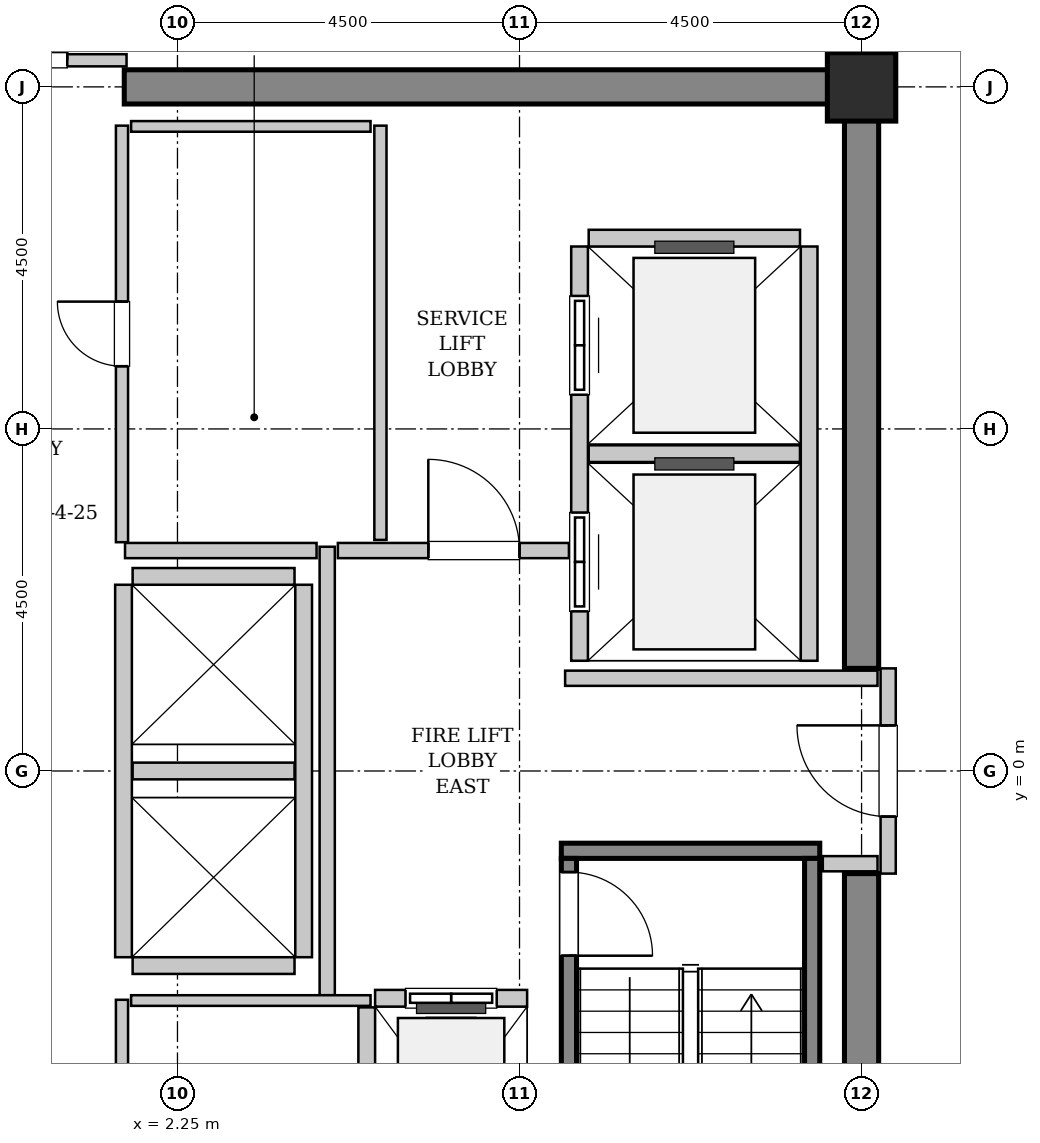
"""IFC4 building model, lengths in metres.
Left out: names, types, materials, properties, quantities, classifications, styles, units other than length and angle.
Written with IfcOpenShell. Run it as: python <this file> out.ifc"""

import sys

from ifc_helpers import new_model, si_unit, direction, frame, frame_2d, origin, origin_2d, place, context, subcontext, project, spatial, rectangle, extrude, source, transform, mapped, element, fill, save


model = new_model("IFC4")
c1 = context("Model", 3, precision=1e-05, world=origin(), true_north=direction((0.0, 1.0)))
c2 = subcontext(c1, "Body", "Model", "MODEL_VIEW")
j1 = project(units=[si_unit("LENGTHUNIT", "METRE"), si_unit("PLANEANGLEUNIT", "RADIAN")], contexts=[c1])
p1 = place(None, origin())
s1 = spatial("IfcSite", under=j1, at=p1, CompositionType="ELEMENT")
p2 = place(p1, origin())
s2 = spatial("IfcBuilding", under=s1, at=p2, CompositionType="ELEMENT")
p3 = place(p2, frame((0.0, 0.0, 306.4)))
s3 = spatial("IfcBuildingStorey", under=s2, at=p3, CompositionType="ELEMENT", Elevation=306.4)
m1 = source(origin(), c2, "Body", "SweptSolid", [
    extrude(rectangle(XDim=9.925, YDim=0.45, at=frame_2d((4.962, 0.0))), origin(), (0.0, 0.0, 1.0), 3.8),
])
p4 = place(p3, frame((1.55, 9.0, 0.0), z_axis=(0.0, 0.0, 1.0), x_axis=(1.0, 0.0, 0.0)))
e1 = element("IfcWall", 1, at=p4, inside=s3, PredefinedType="SHEAR", context=c2, shape_type="MappedRepresentation", body=[
    mapped(m1, transform((0.0, 0.0, 0.0), x_axis=(1.0, 0.0, 0.0), y_axis=(0.0, 1.0, 0.0), z_axis=(0.0, 0.0, 1.0), scale=1.0)),
])
m2 = source(origin(), c2, "Body", "SweptSolid", [
    extrude(rectangle(XDim=7.425, YDim=0.45, at=frame_2d((3.712, 0.0))), origin(), (0.0, 0.0, 1.0), 3.8),
])
for number, where, z_axis, x_axis in (
    (2, (11.25, -8.775, 0.0), (0.0, 0.0, 1.0), (0.0, 1.0, 0.0)),
    (3, (11.25, 1.35, 0.0), (0.0, 0.0, 1.0), (0.0, 1.0, 0.0)),
):
    element("IfcWall", number, at=place(p3, frame(where, z_axis=z_axis, x_axis=x_axis)), inside=s3, PredefinedType="SHEAR", context=c2, shape_type="MappedRepresentation", body=[
        mapped(m2, transform((0.0, 0.0, 0.0), x_axis=(1.0, 0.0, 0.0), y_axis=(0.0, 1.0, 0.0), z_axis=(0.0, 0.0, 1.0), scale=1.0)),
    ])
m3 = source(origin(), c2, "Body", "SweptSolid", [
    extrude(rectangle(XDim=0.9, YDim=0.9, at=origin_2d()), origin(), (0.0, 0.0, 1.0), 3.8),
])
p5 = place(p3, frame((11.25, 9.0, 0.0), z_axis=(0.0, 0.0, 1.0), x_axis=(1.0, 0.0, 0.0)))
e4 = element("IfcColumn", 4, at=p5, inside=s3, PredefinedType="COLUMN", context=c2, shape_type="MappedRepresentation", body=[
    mapped(m3, transform((0.0, 0.0, 0.0), x_axis=(1.0, 0.0, 0.0), y_axis=(0.0, 1.0, 0.0), z_axis=(0.0, 0.0, 1.0), scale=1.0)),
])
m4 = source(origin(), c2, "Body", "SweptSolid", [
    extrude(rectangle(XDim=3.4, YDim=0.2, at=frame_2d((1.7, 0.0))), origin(), (0.0, 0.0, 1.0), 3.8),
])
p6 = place(p3, frame((7.3, -1.05, 0.0), z_axis=(0.0, 0.0, 1.0), x_axis=(1.0, 0.0, 0.0)))
e5 = element("IfcWall", 5, at=p6, inside=s3, PredefinedType="SOLIDWALL", context=c2, shape_type="MappedRepresentation", body=[
    mapped(m4, transform((0.0, 0.0, 0.0), x_axis=(1.0, 0.0, 0.0), y_axis=(0.0, 1.0, 0.0), z_axis=(0.0, 0.0, 1.0), scale=1.0)),
])
m5 = source(origin(), c2, "Body", "SweptSolid", [
    extrude(rectangle(XDim=7.1, YDim=0.2, at=frame_2d((3.55, 0.0))), origin(), (0.0, 0.0, 1.0), 3.8),
])
p7 = place(p3, frame((7.4, -1.15, 0.0), z_axis=(0.0, 0.0, 1.0), x_axis=(0.0, -1.0, 0.0)))
e6 = element("IfcWall", 6, at=p7, inside=s3, PredefinedType="SOLIDWALL", context=c2, shape_type="MappedRepresentation", body=[
    mapped(m5, transform((0.0, 0.0, 0.0), x_axis=(1.0, 0.0, 0.0), y_axis=(0.0, 1.0, 0.0), z_axis=(0.0, 0.0, 1.0), scale=1.0)),
])
p8 = place(p7, frame((0.18, 0.0, 0.0)))
e7 = element("IfcOpeningElement", 7, at=p8, cuts=e6, PredefinedType="OPENING", context=c2, shape_type="SweptSolid", body=[
    extrude(rectangle(XDim=1.1, YDim=2.15, at=frame_2d((0.55, 1.075))), frame((0.0, 0.11, 0.0), z_axis=(0.0, -1.0, 0.0), x_axis=(1.0, 0.0, 0.0)), (0.0, 0.0, 1.0), 0.22),
])
p9 = place(p3, frame((10.6, -1.15, 0.0), z_axis=(0.0, 0.0, 1.0), x_axis=(0.0, -1.0, 0.0)))
e8 = element("IfcWall", 8, at=p9, inside=s3, PredefinedType="SOLIDWALL", context=c2, shape_type="MappedRepresentation", body=[
    mapped(m5, transform((0.0, 0.0, 0.0), x_axis=(1.0, 0.0, 0.0), y_axis=(0.0, 1.0, 0.0), z_axis=(0.0, 0.0, 1.0), scale=1.0)),
])
m6 = source(origin(), c2, "Body", "SweptSolid", [
    extrude(rectangle(XDim=2.0, YDim=0.22, at=frame_2d((1.0, 0.0))), origin(), (0.0, 0.0, 1.0), 3.535),
])
p10 = place(p3, frame((6.85, -2.99, 0.0), z_axis=(0.0, 0.0, 1.0), x_axis=(-1.0, 0.0, 0.0)))
e9 = element("IfcWall", 9, at=p10, inside=s3, PredefinedType="SOLIDWALL", context=c2, shape_type="MappedRepresentation", body=[
    mapped(m6, transform((0.0, 0.0, 0.0), x_axis=(1.0, 0.0, 0.0), y_axis=(0.0, 1.0, 0.0), z_axis=(0.0, 0.0, 1.0), scale=1.0)),
])
p11 = place(p10, frame((0.4, 0.0, 0.0)))
e10 = element("IfcOpeningElement", 10, at=p11, cuts=e9, PredefinedType="OPENING", context=c2, shape_type="SweptSolid", body=[
    extrude(rectangle(XDim=1.2, YDim=2.2, at=frame_2d((0.6, 1.1))), frame((0.0, 0.12, 0.0), z_axis=(0.0, -1.0, 0.0), x_axis=(1.0, 0.0, 0.0)), (0.0, 0.0, 1.0), 0.24),
])
m7 = source(origin(), c2, "Body", "SweptSolid", [
    extrude(rectangle(XDim=2.68, YDim=0.22, at=frame_2d((1.34, 0.0))), origin(), (0.0, 0.0, 1.0), 3.535),
])
p12 = place(p3, frame((4.74, -3.11, 0.0), z_axis=(0.0, 0.0, 1.0), x_axis=(0.0, -1.0, 0.0)))
e11 = element("IfcWall", 11, at=p12, inside=s3, PredefinedType="SOLIDWALL", context=c2, shape_type="MappedRepresentation", body=[
    mapped(m7, transform((0.0, 0.0, 0.0), x_axis=(1.0, 0.0, 0.0), y_axis=(0.0, 1.0, 0.0), z_axis=(0.0, 0.0, 1.0), scale=1.0)),
])
m8 = source(origin(), c2, "Body", "SweptSolid", [
    extrude(rectangle(XDim=5.45, YDim=0.22, at=frame_2d((2.725, 0.0))), origin(), (0.0, 0.0, 1.0), 3.535),
])
p13 = place(p3, frame((7.54, 6.9, 0.0), z_axis=(0.0, 0.0, 1.0), x_axis=(0.0, -1.0, 0.0)))
e12 = element("IfcWall", 12, at=p13, inside=s3, PredefinedType="SOLIDWALL", context=c2, shape_type="MappedRepresentation", body=[
    mapped(m8, transform((0.0, 0.0, 0.0), x_axis=(1.0, 0.0, 0.0), y_axis=(0.0, 1.0, 0.0), z_axis=(0.0, 0.0, 1.0), scale=1.0)),
])
p14 = place(p13, frame((3.5, 0.0, 0.0)))
e13 = element("IfcOpeningElement", 13, at=p14, cuts=e12, PredefinedType="OPENING", context=c2, shape_type="SweptSolid", body=[
    extrude(rectangle(XDim=1.3, YDim=2.3, at=frame_2d((0.65, 1.15))), frame((0.0, 0.12, 0.0), z_axis=(0.0, -1.0, 0.0), x_axis=(1.0, 0.0, 0.0)), (0.0, 0.0, 1.0), 0.24),
])
p15 = place(p13, frame((0.65, 0.0, 0.0)))
e14 = element("IfcOpeningElement", 14, at=p15, cuts=e12, PredefinedType="OPENING", context=c2, shape_type="SweptSolid", body=[
    extrude(rectangle(XDim=1.3, YDim=2.3, at=frame_2d((0.65, 1.15))), frame((0.0, 0.12, 0.0), z_axis=(0.0, -1.0, 0.0), x_axis=(1.0, 0.0, 0.0)), (0.0, 0.0, 1.0), 0.24),
])
p16 = place(p3, frame((10.56, 1.45, 0.0), z_axis=(0.0, 0.0, 1.0), x_axis=(0.0, 1.0, 0.0)))
e15 = element("IfcWall", 15, at=p16, inside=s3, PredefinedType="SOLIDWALL", context=c2, shape_type="MappedRepresentation", body=[
    mapped(m8, transform((0.0, 0.0, 0.0), x_axis=(1.0, 0.0, 0.0), y_axis=(0.0, 1.0, 0.0), z_axis=(0.0, 0.0, 1.0), scale=1.0)),
])
m9 = source(origin(), c2, "Body", "SweptSolid", [
    extrude(rectangle(XDim=2.78, YDim=0.22, at=frame_2d((1.39, 0.0))), origin(), (0.0, 0.0, 1.0), 3.535),
])
for number, where, z_axis, x_axis in (
    (16, (7.66, 4.175, 0.0), (0.0, 0.0, 1.0), (1.0, 0.0, 0.0)),
    (17, (10.44, 7.01, 0.0), (0.0, 0.0, 1.0), (-1.0, 0.0, 0.0)),
):
    element("IfcWall", number, at=place(p3, frame(where, z_axis=z_axis, x_axis=x_axis)), inside=s3, PredefinedType="SOLIDWALL", context=c2, shape_type="MappedRepresentation", body=[
        mapped(m9, transform((0.0, 0.0, 0.0), x_axis=(1.0, 0.0, 0.0), y_axis=(0.0, 1.0, 0.0), z_axis=(0.0, 0.0, 1.0), scale=1.0)),
    ])
m10 = source(origin(), c2, "Body", "SweptSolid", [
    extrude(rectangle(XDim=4.9, YDim=0.22, at=frame_2d((2.45, 0.0))), origin(), (0.0, 0.0, 1.0), 3.535),
])
for number, where, z_axis, x_axis in (
    (18, (1.54, 2.45, 0.0), (0.0, 0.0, 1.0), (0.0, -1.0, 0.0)),
    (19, (3.91, -2.45, 0.0), (0.0, 0.0, 1.0), (0.0, 1.0, 0.0)),
):
    element("IfcWall", number, at=place(p3, frame(where, z_axis=z_axis, x_axis=x_axis)), inside=s3, PredefinedType="SOLIDWALL", context=c2, shape_type="MappedRepresentation", body=[
        mapped(m10, transform((0.0, 0.0, 0.0), x_axis=(1.0, 0.0, 0.0), y_axis=(0.0, 1.0, 0.0), z_axis=(0.0, 0.0, 1.0), scale=1.0)),
    ])
m11 = source(origin(), c2, "Body", "SweptSolid", [
    extrude(rectangle(XDim=2.13, YDim=0.22, at=frame_2d((1.065, 0.0))), origin(), (0.0, 0.0, 1.0), 3.535),
])
for number, where, z_axis, x_axis in (
    (20, (1.66, -2.56, 0.0), (0.0, 0.0, 1.0), (1.0, 0.0, 0.0)),
    (21, (1.66, 0.0, 0.0), (0.0, 0.0, 1.0), (1.0, 0.0, 0.0)),
    (22, (3.79, 2.56, 0.0), (0.0, 0.0, 1.0), (-1.0, 0.0, 0.0)),
):
    element("IfcWall", number, at=place(p3, frame(where, z_axis=z_axis, x_axis=x_axis)), inside=s3, PredefinedType="SOLIDWALL", context=c2, shape_type="MappedRepresentation", body=[
        mapped(m11, transform((0.0, 0.0, 0.0), x_axis=(1.0, 0.0, 0.0), y_axis=(0.0, 1.0, 0.0), z_axis=(0.0, 0.0, 1.0), scale=1.0)),
    ])
m12 = source(origin(), c2, "Body", "SweptSolid", [
    extrude(rectangle(XDim=2.7, YDim=0.2, at=frame_2d((1.35, 0.0))), origin(), (0.0, 0.0, 1.0), 2.625),
])
p17 = place(p3, frame((11.6, -1.35, 0.0), z_axis=(0.0, 0.0, 1.0), x_axis=(0.0, 1.0, 0.0)))
e23 = element("IfcWall", 23, at=p17, inside=s3, PredefinedType="PARTITIONING", context=c2, shape_type="MappedRepresentation", body=[
    mapped(m12, transform((0.0, 0.0, 0.0), x_axis=(1.0, 0.0, 0.0), y_axis=(0.0, 1.0, 0.0), z_axis=(0.0, 0.0, 1.0), scale=1.0)),
])
p18 = place(p17, frame((0.75, 0.0, 0.0)))
e24 = element("IfcOpeningElement", 24, at=p18, cuts=e23, PredefinedType="OPENING", context=c2, shape_type="SweptSolid", body=[
    extrude(rectangle(XDim=1.2, YDim=2.15, at=frame_2d((0.6, 1.075))), frame((0.0, 0.11, 0.0), z_axis=(0.0, -1.0, 0.0), x_axis=(1.0, 0.0, 0.0)), (0.0, 0.0, 1.0), 0.22),
])
m13 = source(origin(), c2, "Body", "SweptSolid", [
    extrude(rectangle(XDim=5.9, YDim=0.2, at=frame_2d((2.95, 0.0))), origin(), (0.0, 0.0, 1.0), 3.535),
])
p19 = place(p3, frame((4.22, -2.95, 0.0), z_axis=(0.0, 0.0, 1.0), x_axis=(0.0, 1.0, 0.0)))
e25 = element("IfcWall", 25, at=p19, inside=s3, PredefinedType="PARTITIONING", context=c2, shape_type="MappedRepresentation", body=[
    mapped(m13, transform((0.0, 0.0, 0.0), x_axis=(1.0, 0.0, 0.0), y_axis=(0.0, 1.0, 0.0), z_axis=(0.0, 0.0, 1.0), scale=1.0)),
])
m14 = source(origin(), c2, "Body", "SweptSolid", [
    extrude(rectangle(XDim=2.52, YDim=0.2, at=frame_2d((1.26, 0.0))), origin(), (0.0, 0.0, 1.0), 3.535),
])
p20 = place(p3, frame((1.56, 2.9, 0.0), z_axis=(0.0, 0.0, 1.0), x_axis=(1.0, 0.0, 0.0)))
e26 = element("IfcWall", 26, at=p20, inside=s3, PredefinedType="PARTITIONING", context=c2, shape_type="MappedRepresentation", body=[
    mapped(m14, transform((0.0, 0.0, 0.0), x_axis=(1.0, 0.0, 0.0), y_axis=(0.0, 1.0, 0.0), z_axis=(0.0, 0.0, 1.0), scale=1.0)),
])
m15 = source(origin(), c2, "Body", "SweptSolid", [
    extrude(rectangle(XDim=3.04, YDim=0.2, at=frame_2d((1.52, 0.0))), origin(), (0.0, 0.0, 1.0), 3.535),
])
p21 = place(p3, frame((4.36, 2.9, 0.0), z_axis=(0.0, 0.0, 1.0), x_axis=(1.0, 0.0, 0.0)))
e27 = element("IfcWall", 27, at=p21, inside=s3, PredefinedType="PARTITIONING", context=c2, shape_type="MappedRepresentation", body=[
    mapped(m15, transform((0.0, 0.0, 0.0), x_axis=(1.0, 0.0, 0.0), y_axis=(0.0, 1.0, 0.0), z_axis=(0.0, 0.0, 1.0), scale=1.0)),
])
p22 = place(p21, frame((1.19, 0.0, 0.0)))
e28 = element("IfcOpeningElement", 28, at=p22, cuts=e27, PredefinedType="OPENING", context=c2, shape_type="SweptSolid", body=[
    extrude(rectangle(XDim=1.2, YDim=2.15, at=frame_2d((0.6, 1.075))), frame((0.0, 0.11, 0.0), z_axis=(0.0, -1.0, 0.0), x_axis=(1.0, 0.0, 0.0)), (0.0, 0.0, 1.0), 0.22),
])
m16 = source(origin(), c2, "Body", "SweptSolid", [
    extrude(rectangle(XDim=4.11, YDim=0.2, at=frame_2d((2.055, 0.0))), origin(), (0.0, 0.0, 1.0), 3.535),
])
p23 = place(p3, frame((7.35, 1.22, 0.0), z_axis=(0.0, 0.0, 1.0), x_axis=(1.0, 0.0, 0.0)))
e29 = element("IfcWall", 29, at=p23, inside=s3, PredefinedType="PARTITIONING", context=c2, shape_type="MappedRepresentation", body=[
    mapped(m16, transform((0.0, 0.0, 0.0), x_axis=(1.0, 0.0, 0.0), y_axis=(0.0, 1.0, 0.0), z_axis=(0.0, 0.0, 1.0), scale=1.0)),
])
m17 = source(origin(), c2, "Body", "SweptSolid", [
    extrude(rectangle(XDim=0.72, YDim=0.2, at=frame_2d((0.36, 0.0))), origin(), (0.0, 0.0, 1.0), 3.535),
])
p24 = place(p3, frame((10.74, -1.22, 0.0), z_axis=(0.0, 0.0, 1.0), x_axis=(1.0, 0.0, 0.0)))
e30 = element("IfcWall", 30, at=p24, inside=s3, PredefinedType="PARTITIONING", context=c2, shape_type="MappedRepresentation", body=[
    mapped(m17, transform((0.0, 0.0, 0.0), x_axis=(1.0, 0.0, 0.0), y_axis=(0.0, 1.0, 0.0), z_axis=(0.0, 0.0, 1.0), scale=1.0)),
])
m18 = source(origin(), c2, "Body", "SweptSolid", [
    extrude(rectangle(XDim=3.16, YDim=0.16, at=frame_2d((1.58, 0.0))), origin(), (0.0, 0.0, 1.0), 2.625),
])
p25 = place(p3, frame((-1.58, 9.35, 0.0), z_axis=(0.0, 0.0, 1.0), x_axis=(1.0, 0.0, 0.0)))
e31 = element("IfcWall", 31, at=p25, inside=s3, PredefinedType="PARTITIONING", context=c2, shape_type="MappedRepresentation", body=[
    mapped(m18, transform((0.0, 0.0, 0.0), x_axis=(1.0, 0.0, 0.0), y_axis=(0.0, 1.0, 0.0), z_axis=(0.0, 0.0, 1.0), scale=1.0)),
])
p26 = place(p25, frame((0.78, 0.0, 0.0)))
e32 = element("IfcOpeningElement", 32, at=p26, cuts=e31, PredefinedType="OPENING", context=c2, shape_type="SweptSolid", body=[
    extrude(rectangle(XDim=1.6, YDim=2.3, at=frame_2d((0.8, 1.15))), frame((0.0, 0.09, 0.0), z_axis=(0.0, -1.0, 0.0), x_axis=(1.0, 0.0, 0.0)), (0.0, 0.0, 1.0), 0.18),
])
m19 = source(origin(), c2, "Body", "SweptSolid", [
    extrude(rectangle(XDim=5.45, YDim=0.16, at=frame_2d((2.725, 0.0))), origin(), (0.0, 0.0, 1.0), 3.535),
])
p27 = place(p3, frame((4.92, 3.04, 0.0), z_axis=(0.0, 0.0, 1.0), x_axis=(0.0, 1.0, 0.0)))
e33 = element("IfcWall", 33, at=p27, inside=s3, PredefinedType="PARTITIONING", context=c2, shape_type="MappedRepresentation", body=[
    mapped(m19, transform((0.0, 0.0, 0.0), x_axis=(1.0, 0.0, 0.0), y_axis=(0.0, 1.0, 0.0), z_axis=(0.0, 0.0, 1.0), scale=1.0)),
])
m20 = source(origin(), c2, "Body", "SweptSolid", [
    extrude(rectangle(XDim=5.48, YDim=0.16, at=frame_2d((2.74, 0.0))), origin(), (0.0, 0.0, 1.0), 3.535),
])
p28 = place(p3, frame((1.52, 3.01, 0.0), z_axis=(0.0, 0.0, 1.0), x_axis=(0.0, 1.0, 0.0)))
e34 = element("IfcWall", 34, at=p28, inside=s3, PredefinedType="PARTITIONING", context=c2, shape_type="MappedRepresentation", body=[
    mapped(m20, transform((0.0, 0.0, 0.0), x_axis=(1.0, 0.0, 0.0), y_axis=(0.0, 1.0, 0.0), z_axis=(0.0, 0.0, 1.0), scale=1.0)),
])
p29 = place(p28, frame((2.315, 0.0, 0.0)))
e35 = element("IfcOpeningElement", 35, at=p29, cuts=e34, PredefinedType="OPENING", context=c2, shape_type="SweptSolid", body=[
    extrude(rectangle(XDim=0.85, YDim=2.1, at=frame_2d((0.425, 1.05))), frame((0.0, 0.09, 0.0), z_axis=(0.0, -1.0, 0.0), x_axis=(1.0, 0.0, 0.0)), (0.0, 0.0, 1.0), 0.18),
])
m21 = source(origin(), c2, "Body", "SweptSolid", [
    extrude(rectangle(XDim=3.15, YDim=0.14, at=frame_2d((1.575, 0.0))), origin(), (0.0, 0.0, 1.0), 3.535),
])
p30 = place(p3, frame((1.64, 8.48, 0.0), z_axis=(0.0, 0.0, 1.0), x_axis=(1.0, 0.0, 0.0)))
e36 = element("IfcWall", 36, at=p30, inside=s3, PredefinedType="PARTITIONING", context=c2, shape_type="MappedRepresentation", body=[
    mapped(m21, transform((0.0, 0.0, 0.0), x_axis=(1.0, 0.0, 0.0), y_axis=(0.0, 1.0, 0.0), z_axis=(0.0, 0.0, 1.0), scale=1.0)),
])
p31 = place(p3, frame((1.52, -8.49, 0.0), z_axis=(0.0, 0.0, 1.0), x_axis=(0.0, 1.0, 0.0)))
e37 = element("IfcWall", 37, at=p31, inside=s3, PredefinedType="PARTITIONING", context=c2, shape_type="MappedRepresentation", body=[
    mapped(m20, transform((0.0, 0.0, 0.0), x_axis=(1.0, 0.0, 0.0), y_axis=(0.0, 1.0, 0.0), z_axis=(0.0, 0.0, 1.0), scale=1.0)),
])
p32 = place(p31, frame((2.315, 0.0, 0.0)))
e38 = element("IfcOpeningElement", 38, at=p32, cuts=e37, PredefinedType="OPENING", context=c2, shape_type="SweptSolid", body=[
    extrude(rectangle(XDim=0.85, YDim=2.1, at=frame_2d((0.425, 1.05))), frame((0.0, 0.09, 0.0), z_axis=(0.0, -1.0, 0.0), x_axis=(1.0, 0.0, 0.0)), (0.0, 0.0, 1.0), 0.18),
])
p33 = place(p3, frame((1.64, -3.02, 0.0), z_axis=(0.0, 0.0, 1.0), x_axis=(1.0, 0.0, 0.0)))
e39 = element("IfcWall", 39, at=p33, inside=s3, PredefinedType="PARTITIONING", context=c2, shape_type="MappedRepresentation", body=[
    mapped(m21, transform((0.0, 0.0, 0.0), x_axis=(1.0, 0.0, 0.0), y_axis=(0.0, 1.0, 0.0), z_axis=(0.0, 0.0, 1.0), scale=1.0)),
])
m22 = source(origin(), c2, "Body", "SweptSolid", [
    extrude(rectangle(XDim=1.1, YDim=2.15, at=frame_2d((0.55, 1.075))), frame((0.0, 0.025, 0.0), z_axis=(0.0, -1.0, 0.0), x_axis=(1.0, 0.0, 0.0)), (0.0, 0.0, 1.0), 0.05),
])
p34 = place(p8, origin())
e40 = element("IfcDoor", 40, at=p34, inside=s3, OperationType="SINGLE_SWING_RIGHT", PredefinedType="DOOR", context=c2, shape_type="MappedRepresentation", body=[
    mapped(m22, transform((0.0, 0.0, 0.0), x_axis=(1.0, 0.0, 0.0), y_axis=(0.0, 1.0, 0.0), z_axis=(0.0, 0.0, 1.0), scale=1.0)),
])
fill(e7, e40)
m23 = source(origin(), c2, "Body", "SweptSolid", [
    extrude(rectangle(XDim=1.2, YDim=2.2, at=frame_2d((0.6, 1.1))), frame((0.0, 0.025, 0.0), z_axis=(0.0, -1.0, 0.0), x_axis=(1.0, 0.0, 0.0)), (0.0, 0.0, 1.0), 0.05),
])
p35 = place(p11, origin())
e41 = element("IfcDoor", 41, at=p35, inside=s3, OperationType="SLIDING_TO_LEFT", PredefinedType="DOOR", context=c2, shape_type="MappedRepresentation", body=[
    mapped(m23, transform((0.0, 0.0, 0.0), x_axis=(1.0, 0.0, 0.0), y_axis=(0.0, 1.0, 0.0), z_axis=(0.0, 0.0, 1.0), scale=1.0)),
])
fill(e10, e41)
m24 = source(origin(), c2, "Body", "SweptSolid", [
    extrude(rectangle(XDim=1.3, YDim=2.3, at=frame_2d((0.65, 1.15))), frame((0.0, 0.025, 0.0), z_axis=(0.0, -1.0, 0.0), x_axis=(1.0, 0.0, 0.0)), (0.0, 0.0, 1.0), 0.05),
])
p36 = place(p14, origin())
e42 = element("IfcDoor", 42, at=p36, inside=s3, OperationType="SLIDING_TO_RIGHT", PredefinedType="DOOR", context=c2, shape_type="MappedRepresentation", body=[
    mapped(m24, transform((0.0, 0.0, 0.0), x_axis=(1.0, 0.0, 0.0), y_axis=(0.0, 1.0, 0.0), z_axis=(0.0, 0.0, 1.0), scale=1.0)),
])
fill(e13, e42)
p37 = place(p15, origin())
e43 = element("IfcDoor", 43, at=p37, inside=s3, OperationType="SLIDING_TO_RIGHT", PredefinedType="DOOR", context=c2, shape_type="MappedRepresentation", body=[
    mapped(m24, transform((0.0, 0.0, 0.0), x_axis=(1.0, 0.0, 0.0), y_axis=(0.0, 1.0, 0.0), z_axis=(0.0, 0.0, 1.0), scale=1.0)),
])
fill(e14, e43)
m25 = source(origin(), c2, "Body", "SweptSolid", [
    extrude(rectangle(XDim=1.2, YDim=2.15, at=frame_2d((0.6, 1.075))), frame((0.0, 0.025, 0.0), z_axis=(0.0, -1.0, 0.0), x_axis=(1.0, 0.0, 0.0)), (0.0, 0.0, 1.0), 0.05),
])
p38 = place(p18, origin())
e44 = element("IfcDoor", 44, at=p38, inside=s3, OperationType="SINGLE_SWING_RIGHT", PredefinedType="DOOR", context=c2, shape_type="MappedRepresentation", body=[
    mapped(m25, transform((0.0, 0.0, 0.0), x_axis=(1.0, 0.0, 0.0), y_axis=(0.0, 1.0, 0.0), z_axis=(0.0, 0.0, 1.0), scale=1.0)),
])
fill(e24, e44)
p39 = place(p22, origin())
e45 = element("IfcDoor", 45, at=p39, inside=s3, OperationType="SINGLE_SWING_LEFT", PredefinedType="DOOR", context=c2, shape_type="MappedRepresentation", body=[
    mapped(m25, transform((0.0, 0.0, 0.0), x_axis=(1.0, 0.0, 0.0), y_axis=(0.0, 1.0, 0.0), z_axis=(0.0, 0.0, 1.0), scale=1.0)),
])
fill(e28, e45)
m26 = source(origin(), c2, "Body", "SweptSolid", [
    extrude(rectangle(XDim=1.6, YDim=2.3, at=frame_2d((0.8, 1.15))), frame((0.0, 0.025, 0.0), z_axis=(0.0, -1.0, 0.0), x_axis=(1.0, 0.0, 0.0)), (0.0, 0.0, 1.0), 0.05),
])
p40 = place(p26, origin())
e46 = element("IfcDoor", 46, at=p40, inside=s3, OperationType="DOUBLE_DOOR_SINGLE_SWING", PredefinedType="DOOR", context=c2, shape_type="MappedRepresentation", body=[
    mapped(m26, transform((0.0, 0.0, 0.0), x_axis=(1.0, 0.0, 0.0), y_axis=(0.0, 1.0, 0.0), z_axis=(0.0, 0.0, 1.0), scale=1.0)),
])
fill(e32, e46)
m27 = source(origin(), c2, "Body", "SweptSolid", [
    extrude(rectangle(XDim=0.85, YDim=2.1, at=frame_2d((0.425, 1.05))), frame((0.0, 0.025, 0.0), z_axis=(0.0, -1.0, 0.0), x_axis=(1.0, 0.0, 0.0)), (0.0, 0.0, 1.0), 0.05),
])
p41 = place(p29, origin())
e47 = element("IfcDoor", 47, at=p41, inside=s3, OperationType="SINGLE_SWING_RIGHT", PredefinedType="DOOR", context=c2, shape_type="MappedRepresentation", body=[
    mapped(m27, transform((0.0, 0.0, 0.0), x_axis=(1.0, 0.0, 0.0), y_axis=(0.0, 1.0, 0.0), z_axis=(0.0, 0.0, 1.0), scale=1.0)),
])
fill(e35, e47)
save(model, sys.argv[1])
